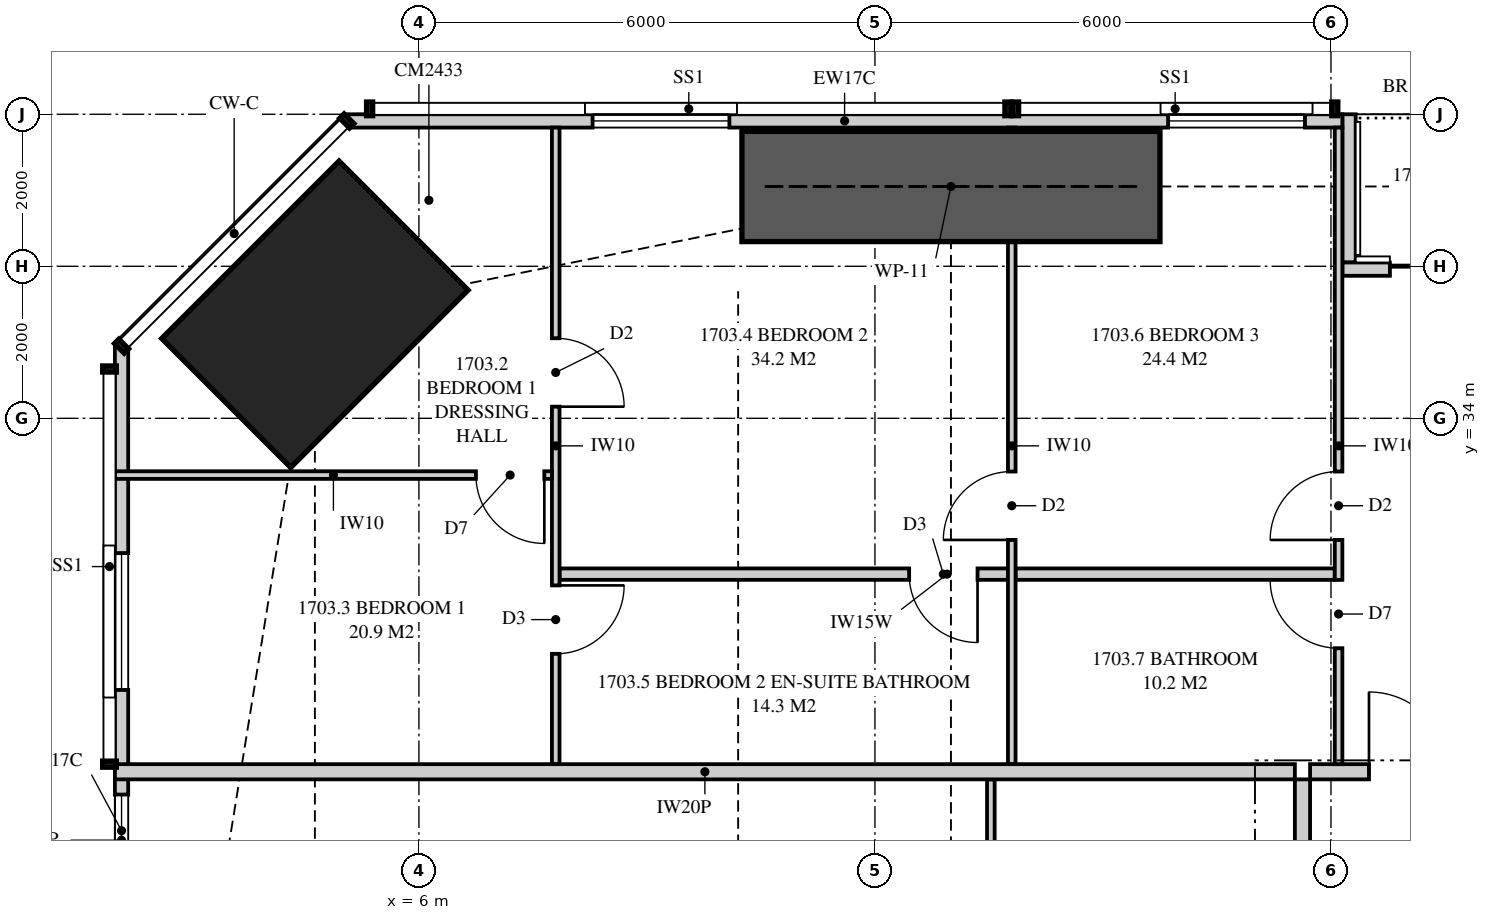
"""IFC4 building model, lengths in metres.
Left out: names, types, materials, properties, quantities, classifications, styles, units other than length and angle.
Written with IfcOpenShell. Run it as: python <this file> out.ifc"""

import sys

from ifc_helpers import new_model, si_unit, direction, frame, frame_2d, origin, origin_2d, place, context, subcontext, project, spatial, polyline, rectangle, outline, extrude, element, fill, save


model = new_model("IFC4")
c1 = context("Model", 3, precision=1e-05, world=origin(), true_north=direction((0.0, 1.0)))
c2 = subcontext(c1, "Body", "Model", "MODEL_VIEW")
j1 = project(units=[si_unit("LENGTHUNIT", "METRE"), si_unit("PLANEANGLEUNIT", "RADIAN")], contexts=[c1])
p1 = place(None, origin())
s1 = spatial("IfcSite", under=j1, at=p1, CompositionType="ELEMENT")
p2 = place(p1, origin())
s2 = spatial("IfcBuilding", under=s1, at=p2, CompositionType="ELEMENT")
p3 = place(p2, frame((0.0, 0.0, 64.55)))
s3 = spatial("IfcBuildingStorey", under=s2, at=p3, CompositionType="ELEMENT", Elevation=64.55)
p4 = place(p3, frame((4.631, 35.369, 0.0), z_axis=(0.0, 0.0, 1.0), x_axis=(0.707106781187, -0.707106781187, 0.0)))
e1 = element("IfcColumn", 1, at=p4, inside=s3, PredefinedType="COLUMN", context=c2, shape_type="SweptSolid", body=[
    extrude(rectangle(XDim=2.4, YDim=3.3, at=origin_2d()), origin(), (0.0, 0.0, 1.0), 3.35),
])
p5 = place(p3, frame((18.15, 37.913, 0.0), z_axis=(0.0, 0.0, 1.0), x_axis=(-1.0, 0.0, 0.0)))
e2 = element("IfcWall", 2, at=p5, inside=s3, PredefinedType="SOLIDWALL", context=c2, shape_type="SweptSolid", body=[
    extrude(outline(polyline([(0.0, 0.0), (13.099, 0.0), (13.099, 3.11), (5.354, 3.11), (5.354, 2.15), (5.306, 2.15), (5.306, 3.11), (5.15, 3.11), (5.15, 2.15), (0.0, 2.15), (0.0, 0.0)])), frame((0.0, 0.087, 0.0), z_axis=(0.0, -1.0, 0.0), x_axis=(1.0, 0.0, 0.0)), (0.0, 0.0, 1.0), 0.175),
])
p6 = place(p5, frame((0.492, 0.0, 0.4)))
e3 = element("IfcOpeningElement", 3, at=p6, cuts=e2, PredefinedType="OPENING", context=c2, shape_type="SweptSolid", body=[
    extrude(rectangle(XDim=1.8, YDim=1.7, at=frame_2d((0.9, 0.85))), frame((0.0, 0.097, 0.0), z_axis=(0.0, -1.0, 0.0), x_axis=(1.0, 0.0, 0.0)), (0.0, 0.0, 1.0), 0.195),
])
p7 = place(p5, frame((8.065, 0.0, 0.4)))
e4 = element("IfcOpeningElement", 4, at=p7, cuts=e2, PredefinedType="OPENING", context=c2, shape_type="SweptSolid", body=[
    extrude(rectangle(XDim=1.8, YDim=1.7, at=frame_2d((0.9, 0.85))), frame((0.0, 0.097, 0.0), z_axis=(0.0, -1.0, 0.0), x_axis=(1.0, 0.0, 0.0)), (0.0, 0.0, 1.0), 0.195),
])
p8 = place(p3, frame((21.2, 35.962, 0.0), z_axis=(0.0, 0.0, 1.0), x_axis=(-1.0, 0.0, 0.0)))
e5 = element("IfcWall", 5, at=p8, inside=s3, PredefinedType="SOLIDWALL", context=c2, shape_type="SweptSolid", body=[
    extrude(rectangle(XDim=3.05, YDim=0.175, at=frame_2d((1.525, 0.0))), origin(), (0.0, 0.0, 1.0), 3.11),
])
p9 = place(p8, frame((0.625, 0.0, 0.0)))
e6 = element("IfcOpeningElement", 6, at=p9, cuts=e5, PredefinedType="OPENING", context=c2, shape_type="SweptSolid", body=[
    extrude(rectangle(XDim=1.8, YDim=2.1, at=frame_2d((0.9, 1.05))), frame((0.0, 0.097, 0.0), z_axis=(0.0, -1.0, 0.0), x_axis=(1.0, 0.0, 0.0)), (0.0, 0.0, 1.0), 0.195),
])
p10 = place(p3, frame((18.238, 38.0, 0.0), z_axis=(0.0, 0.0, 1.0), x_axis=(0.0, -1.0, 0.0)))
e7 = element("IfcWall", 7, at=p10, inside=s3, PredefinedType="SOLIDWALL", context=c2, shape_type="SweptSolid", body=[
    extrude(outline(polyline([(0.0, 0.0), (1.95, 0.0), (1.95, 3.11), (1.75, 3.11), (1.75, 2.15), (0.15, 2.15), (0.15, 3.11), (0.0, 3.11), (0.0, 0.0)])), frame((0.0, 0.087, 0.0), z_axis=(0.0, -1.0, 0.0), x_axis=(1.0, 0.0, 0.0)), (0.0, 0.0, 1.0), 0.175),
])
p11 = place(p3, frame((2.087, 34.949, 0.0), z_axis=(0.0, 0.0, 1.0), x_axis=(0.0, -1.0, 0.0)))
e8 = element("IfcWall", 8, at=p11, inside=s3, PredefinedType="SOLIDWALL", context=c2, shape_type="SweptSolid", body=[
    extrude(outline(polyline([(0.0, 0.0), (12.749, 0.0), (12.749, 2.15), (9.949, 2.15), (9.949, 3.11), (9.823, 3.11), (9.823, 2.15), (9.73, 2.15), (9.73, 3.11), (0.0, 3.11), (0.0, 0.0)])), frame((0.0, 0.087, 0.0), z_axis=(0.0, -1.0, 0.0), x_axis=(1.0, 0.0, 0.0)), (0.0, 0.0, 1.0), 0.175),
])
p12 = place(p11, frame((2.722, 0.0, 0.4)))
e9 = element("IfcOpeningElement", 9, at=p12, cuts=e8, PredefinedType="OPENING", context=c2, shape_type="SweptSolid", body=[
    extrude(rectangle(XDim=1.8, YDim=1.7, at=frame_2d((0.9, 0.85))), frame((0.0, 0.097, 0.0), z_axis=(0.0, -1.0, 0.0), x_axis=(1.0, 0.0, 0.0)), (0.0, 0.0, 1.0), 0.195),
])
p13 = place(p11, frame((5.899, 0.0, 0.4)))
e10 = element("IfcOpeningElement", 10, at=p13, cuts=e8, PredefinedType="OPENING", context=c2, shape_type="SweptSolid", body=[
    extrude(rectangle(XDim=1.2, YDim=1.7, at=frame_2d((0.6, 0.85))), frame((0.0, 0.097, 0.0), z_axis=(0.0, -1.0, 0.0), x_axis=(1.0, 0.0, 0.0)), (0.0, 0.0, 1.0), 0.195),
])
p14 = place(p3, frame((17.725, 29.35, 0.0), z_axis=(0.0, 0.0, 1.0), x_axis=(1.0, 0.0, 0.0)))
e11 = element("IfcWall", 11, at=p14, inside=s3, PredefinedType="PARTITIONING", context=c2, shape_type="SweptSolid", body=[
    extrude(outline(polyline([(0.0, 0.0), (7.075, 0.0), (7.075, 3.11), (6.612, 3.11), (6.612, 2.541), (5.938, 2.541), (5.938, 3.11), (0.0, 3.11), (0.0, 0.0)])), frame((0.0, 0.1, 0.0), z_axis=(0.0, -1.0, 0.0), x_axis=(1.0, 0.0, 0.0)), (0.0, 0.0, 1.0), 0.2),
])
p15 = place(p14, frame((0.775, 0.0, 0.0)))
e12 = element("IfcOpeningElement", 12, at=p15, cuts=e11, PredefinedType="OPENING", context=c2, shape_type="SweptSolid", body=[
    extrude(rectangle(XDim=1.05, YDim=2.2, at=frame_2d((0.525, 1.1))), frame((0.0, 0.11, 0.0), z_axis=(0.0, -1.0, 0.0), x_axis=(1.0, 0.0, 0.0)), (0.0, 0.0, 1.0), 0.22),
])
p16 = place(p3, frame((7.8, 37.825, 0.0), z_axis=(0.0, 0.0, 1.0), x_axis=(0.0, -1.0, 0.0)))
e13 = element("IfcWall", 13, at=p16, inside=s3, PredefinedType="PARTITIONING", context=c2, shape_type="SweptSolid", body=[
    extrude(outline(polyline([(0.0, 0.0), (8.375, 0.0), (8.375, 3.11), (2.697, 3.11), (2.697, 2.15), (0.943, 2.15), (0.943, 3.11), (0.0, 3.11), (0.0, 0.0)])), frame((0.0, 0.05, 0.0), z_axis=(0.0, -1.0, 0.0), x_axis=(1.0, 0.0, 0.0)), (0.0, 0.0, 1.0), 0.1),
])
p17 = place(p16, frame((2.772, 0.0, 0.0)))
e14 = element("IfcOpeningElement", 14, at=p17, cuts=e13, PredefinedType="OPENING", context=c2, shape_type="SweptSolid", body=[
    extrude(rectangle(XDim=0.9, YDim=2.1, at=frame_2d((0.45, 1.05))), frame((0.0, 0.06, 0.0), z_axis=(0.0, -1.0, 0.0), x_axis=(1.0, 0.0, 0.0)), (0.0, 0.0, 1.0), 0.12),
])
p18 = place(p16, frame((6.023, 0.0, 0.0)))
e15 = element("IfcOpeningElement", 15, at=p18, cuts=e13, PredefinedType="OPENING", context=c2, shape_type="SweptSolid", body=[
    extrude(rectangle(XDim=0.9, YDim=2.1, at=frame_2d((0.45, 1.05))), frame((0.0, 0.06, 0.0), z_axis=(0.0, -1.0, 0.0), x_axis=(1.0, 0.0, 0.0)), (0.0, 0.0, 1.0), 0.12),
])
p19 = place(p3, frame((13.8, 37.825, 0.0), z_axis=(0.0, 0.0, 1.0), x_axis=(0.0, -1.0, 0.0)))
e16 = element("IfcWall", 16, at=p19, inside=s3, PredefinedType="PARTITIONING", context=c2, shape_type="SweptSolid", body=[
    extrude(outline(polyline([(1.635, 2.15), (0.0, 2.15), (0.0, 0.0), (8.375, 0.0), (8.375, 3.11), (1.635, 3.11), (1.635, 2.15)]), holes=[polyline([(1.021, 0.133), (0.529, 0.133), (0.529, 0.923), (1.021, 0.923), (1.021, 0.133)]), polyline([(1.021, 1.227), (0.529, 1.227), (0.529, 2.017), (1.021, 2.017), (1.021, 1.227)])]), frame((0.0, 0.05, 0.0), z_axis=(0.0, -1.0, 0.0), x_axis=(1.0, 0.0, 0.0)), (0.0, 0.0, 1.0), 0.1),
])
p20 = place(p19, frame((4.525, 0.0, 0.0)))
e17 = element("IfcOpeningElement", 17, at=p20, cuts=e16, PredefinedType="OPENING", context=c2, shape_type="SweptSolid", body=[
    extrude(rectangle(XDim=0.9, YDim=2.1, at=frame_2d((0.45, 1.05))), frame((0.0, 0.06, 0.0), z_axis=(0.0, -1.0, 0.0), x_axis=(1.0, 0.0, 0.0)), (0.0, 0.0, 1.0), 0.12),
])
p21 = place(p3, frame((18.1, 37.825, 0.0), z_axis=(0.0, 0.0, 1.0), x_axis=(0.0, -1.0, 0.0)))
e18 = element("IfcWall", 18, at=p21, inside=s3, PredefinedType="PARTITIONING", context=c2, shape_type="SweptSolid", body=[
    extrude(outline(polyline([(0.0, 0.0), (8.375, 0.0), (8.375, 3.11), (1.635, 3.11), (1.635, 2.15), (0.0, 2.15), (0.0, 3.11), (0.0, 0.0)])), frame((0.0, 0.05, 0.0), z_axis=(0.0, -1.0, 0.0), x_axis=(1.0, 0.0, 0.0)), (0.0, 0.0, 1.0), 0.1),
])
p22 = place(p21, frame((4.525, 0.0, 0.0)))
e19 = element("IfcOpeningElement", 19, at=p22, cuts=e18, PredefinedType="OPENING", context=c2, shape_type="SweptSolid", body=[
    extrude(rectangle(XDim=0.9, YDim=2.1, at=frame_2d((0.45, 1.05))), frame((0.0, 0.06, 0.0), z_axis=(0.0, -1.0, 0.0), x_axis=(1.0, 0.0, 0.0)), (0.0, 0.0, 1.0), 0.12),
])
p23 = place(p21, frame((5.95, 0.0, 0.0)))
e20 = element("IfcOpeningElement", 20, at=p23, cuts=e18, PredefinedType="OPENING", context=c2, shape_type="SweptSolid", body=[
    extrude(rectangle(XDim=0.9, YDim=2.1, at=frame_2d((0.45, 1.05))), frame((0.0, 0.06, 0.0), z_axis=(0.0, -1.0, 0.0), x_axis=(1.0, 0.0, 0.0)), (0.0, 0.0, 1.0), 0.12),
])
p24 = place(p3, frame((2.0, 33.253, 0.0), z_axis=(0.0, 0.0, 1.0), x_axis=(1.0, 0.0, 0.0)))
e21 = element("IfcWall", 21, at=p24, inside=s3, PredefinedType="PARTITIONING", context=c2, shape_type="SweptSolid", body=[
    extrude(outline(polyline([(0.0, 0.0), (5.75, 0.0), (5.75, 3.11), (3.16, 3.11), (3.16, 2.15), (1.417, 2.15), (1.417, 3.11), (0.0, 3.11), (0.0, 0.0)])), frame((0.0, 0.05, 0.0), z_axis=(0.0, -1.0, 0.0), x_axis=(1.0, 0.0, 0.0)), (0.0, 0.0, 1.0), 0.1),
])
p25 = place(p24, frame((4.75, 0.0, 0.0)))
e22 = element("IfcOpeningElement", 22, at=p25, cuts=e21, PredefinedType="OPENING", context=c2, shape_type="SweptSolid", body=[
    extrude(rectangle(XDim=0.9, YDim=2.1, at=frame_2d((0.45, 1.05))), frame((0.0, 0.06, 0.0), z_axis=(0.0, -1.0, 0.0), x_axis=(1.0, 0.0, 0.0)), (0.0, 0.0, 1.0), 0.12),
])
p26 = place(p3, frame((7.85, 31.95, 0.0), z_axis=(0.0, 0.0, 1.0), x_axis=(1.0, 0.0, 0.0)))
e23 = element("IfcWall", 23, at=p26, inside=s3, PredefinedType="PLUMBINGWALL", context=c2, shape_type="SweptSolid", body=[
    extrude(outline(polyline([(0.0, 0.0), (5.9, 0.0), (5.9, 3.11), (5.462, 3.11), (5.462, 2.541), (4.838, 2.541), (4.838, 3.11), (3.635, 3.11), (3.635, 2.51), (1.065, 2.51), (1.065, 3.11), (0.0, 3.11), (0.0, 0.0)])), frame((0.0, 0.075, 0.0), z_axis=(0.0, -1.0, 0.0), x_axis=(1.0, 0.0, 0.0)), (0.0, 0.0, 1.0), 0.15),
])
p27 = place(p26, frame((4.6, 0.0, 0.0)))
e24 = element("IfcOpeningElement", 24, at=p27, cuts=e23, PredefinedType="OPENING", context=c2, shape_type="SweptSolid", body=[
    extrude(rectangle(XDim=0.9, YDim=2.1, at=frame_2d((0.45, 1.05))), frame((0.0, 0.085, 0.0), z_axis=(0.0, -1.0, 0.0), x_axis=(1.0, 0.0, 0.0)), (0.0, 0.0, 1.0), 0.17),
])
p28 = place(p3, frame((13.85, 31.95, 0.0), z_axis=(0.0, 0.0, 1.0), x_axis=(1.0, 0.0, 0.0)))
e25 = element("IfcWall", 25, at=p28, inside=s3, PredefinedType="PLUMBINGWALL", context=c2, shape_type="SweptSolid", body=[
    extrude(rectangle(XDim=4.2, YDim=0.15, at=frame_2d((2.1, 0.0))), origin(), (0.0, 0.0, 1.0), 3.11),
])
p29 = place(p3, frame((2.0, 29.35, 0.0), z_axis=(0.0, 0.0, 1.0), x_axis=(1.0, 0.0, 0.0)))
e26 = element("IfcWall", 26, at=p29, inside=s3, PredefinedType="PARTITIONING", context=c2, shape_type="SweptSolid", body=[
    extrude(outline(polyline([(0.0, 0.0), (15.525, 0.0), (15.525, 3.11), (11.337, 3.11), (11.337, 2.541), (10.663, 2.541), (10.663, 3.11), (9.51, 3.11), (9.51, 2.51), (6.89, 2.51), (6.89, 3.11), (2.969, 3.11), (2.969, 2.541), (2.577, 2.541), (2.577, 2.15), (0.733, 2.15), (0.733, 3.11), (0.0, 3.11), (0.0, 0.0)])), frame((0.0, 0.1, 0.0), z_axis=(0.0, -1.0, 0.0), x_axis=(1.0, 0.0, 0.0)), (0.0, 0.0, 1.0), 0.2),
])
p30 = place(p3, frame((17.625, 14.1, 0.0), z_axis=(0.0, 0.0, 1.0), x_axis=(0.0, 1.0, 0.0)))
e27 = element("IfcWall", 27, at=p30, inside=s3, PredefinedType="PARTITIONING", context=c2, shape_type="SweptSolid", body=[
    extrude(outline(polyline([(0.0, 0.0), (15.15, 0.0), (15.15, 3.11), (11.237, 3.11), (11.237, 2.541), (10.562, 2.541), (10.562, 3.11), (0.0, 3.11), (0.0, 0.0)])), frame((0.0, 0.1, 0.0), z_axis=(0.0, -1.0, 0.0), x_axis=(1.0, 0.0, 0.0)), (0.0, 0.0, 1.0), 0.2),
])
p31 = place(p30, frame((7.075, 0.0, 0.0)))
e28 = element("IfcOpeningElement", 28, at=p31, cuts=e27, PredefinedType="OPENING", context=c2, shape_type="SweptSolid", body=[
    extrude(rectangle(XDim=1.05, YDim=2.2, at=frame_2d((0.525, 1.1))), frame((0.0, 0.11, 0.0), z_axis=(0.0, -1.0, 0.0), x_axis=(1.0, 0.0, 0.0)), (0.0, 0.0, 1.0), 0.22),
])
p32 = place(p3, frame((13.525, 18.15, 0.0), z_axis=(0.0, 0.0, 1.0), x_axis=(0.0, 1.0, 0.0)))
e29 = element("IfcWall", 29, at=p32, inside=s3, PredefinedType="PARTITIONING", context=c2, shape_type="SweptSolid", body=[
    extrude(outline(polyline([(0.0, 0.0), (11.1, 0.0), (11.1, 3.11), (7.137, 3.11), (7.137, 2.541), (6.563, 2.541), (6.563, 3.11), (0.0, 3.11), (0.0, 0.0)])), frame((0.0, 0.05, 0.0), z_axis=(0.0, -1.0, 0.0), x_axis=(1.0, 0.0, 0.0)), (0.0, 0.0, 1.0), 0.1),
])
p33 = place(p32, frame((3.025, 0.0, 0.0)))
e30 = element("IfcOpeningElement", 30, at=p33, cuts=e29, PredefinedType="OPENING", context=c2, shape_type="SweptSolid", body=[
    extrude(rectangle(XDim=1.0, YDim=2.1, at=frame_2d((0.5, 1.05))), frame((0.0, 0.06, 0.0), z_axis=(0.0, -1.0, 0.0), x_axis=(1.0, 0.0, 0.0)), (0.0, 0.0, 1.0), 0.12),
])
p34 = place(p3, frame((10.25, 37.05, 0.0), z_axis=(0.0, 0.0, 1.0), x_axis=(1.0, 0.0, 0.0)))
e31 = element("IfcWall", 31, at=p34, inside=s3, PredefinedType="SHEAR", context=c2, shape_type="SweptSolid", body=[
    extrude(rectangle(XDim=5.5, YDim=1.45, at=frame_2d((2.75, 0.0))), origin(), (0.0, 0.0, 1.0), 3.35),
])
p35 = place(p9, origin())
e32 = element("IfcDoor", 32, at=p35, inside=s3, OperationType="SLIDING_TO_LEFT", PredefinedType="DOOR", context=c2, shape_type="SweptSolid", body=[
    extrude(rectangle(XDim=1.8, YDim=2.1, at=frame_2d((0.9, 1.05))), frame((0.0, 0.025, 0.0), z_axis=(0.0, -1.0, 0.0), x_axis=(1.0, 0.0, 0.0)), (0.0, 0.0, 1.0), 0.05),
])
fill(e6, e32)
p36 = place(p6, origin())
e33 = element("IfcWindow", 33, at=p36, inside=s3, PartitioningType="SINGLE_PANEL", PredefinedType="WINDOW", context=c2, shape_type="SweptSolid", body=[
    extrude(rectangle(XDim=1.8, YDim=1.7, at=frame_2d((0.9, 0.85))), frame((0.0, 0.03, 0.0), z_axis=(0.0, -1.0, 0.0), x_axis=(1.0, 0.0, 0.0)), (0.0, 0.0, 1.0), 0.06),
])
fill(e3, e33)
p37 = place(p7, origin())
e34 = element("IfcWindow", 34, at=p37, inside=s3, PartitioningType="SINGLE_PANEL", PredefinedType="WINDOW", context=c2, shape_type="SweptSolid", body=[
    extrude(rectangle(XDim=1.8, YDim=1.7, at=frame_2d((0.9, 0.85))), frame((0.0, 0.03, 0.0), z_axis=(0.0, -1.0, 0.0), x_axis=(1.0, 0.0, 0.0)), (0.0, 0.0, 1.0), 0.06),
])
fill(e4, e34)
p38 = place(p12, origin())
e35 = element("IfcWindow", 35, at=p38, inside=s3, PartitioningType="SINGLE_PANEL", PredefinedType="WINDOW", context=c2, shape_type="SweptSolid", body=[
    extrude(rectangle(XDim=1.8, YDim=1.7, at=frame_2d((0.9, 0.85))), frame((0.0, 0.03, 0.0), z_axis=(0.0, -1.0, 0.0), x_axis=(1.0, 0.0, 0.0)), (0.0, 0.0, 1.0), 0.06),
])
fill(e9, e35)
p39 = place(p13, origin())
e36 = element("IfcWindow", 36, at=p39, inside=s3, PartitioningType="SINGLE_PANEL", PredefinedType="WINDOW", context=c2, shape_type="SweptSolid", body=[
    extrude(rectangle(XDim=1.2, YDim=1.7, at=frame_2d((0.6, 0.85))), frame((0.0, 0.03, 0.0), z_axis=(0.0, -1.0, 0.0), x_axis=(1.0, 0.0, 0.0)), (0.0, 0.0, 1.0), 0.06),
])
fill(e10, e36)
p40 = place(p15, origin())
e37 = element("IfcDoor", 37, at=p40, inside=s3, OperationType="SINGLE_SWING_LEFT", PredefinedType="DOOR", context=c2, shape_type="SweptSolid", body=[
    extrude(rectangle(XDim=1.05, YDim=2.2, at=frame_2d((0.525, 1.1))), frame((0.0, 0.025, 0.0), z_axis=(0.0, -1.0, 0.0), x_axis=(1.0, 0.0, 0.0)), (0.0, 0.0, 1.0), 0.05),
])
fill(e12, e37)
p41 = place(p25, frame((0.9, 0.0, 0.0), z_axis=(0.0, 0.0, 1.0), x_axis=(-1.0, 0.0, 0.0)))
e38 = element("IfcDoor", 38, at=p41, inside=s3, OperationType="SINGLE_SWING_LEFT", PredefinedType="DOOR", context=c2, shape_type="SweptSolid", body=[
    extrude(rectangle(XDim=0.9, YDim=2.1, at=frame_2d((0.45, 1.05))), frame((0.0, 0.025, 0.0), z_axis=(0.0, -1.0, 0.0), x_axis=(1.0, 0.0, 0.0)), (0.0, 0.0, 1.0), 0.05),
])
fill(e22, e38)
p42 = place(p17, origin())
e39 = element("IfcDoor", 39, at=p42, inside=s3, OperationType="SINGLE_SWING_RIGHT", PredefinedType="DOOR", context=c2, shape_type="SweptSolid", body=[
    extrude(rectangle(XDim=0.9, YDim=2.1, at=frame_2d((0.45, 1.05))), frame((0.0, 0.025, 0.0), z_axis=(0.0, -1.0, 0.0), x_axis=(1.0, 0.0, 0.0)), (0.0, 0.0, 1.0), 0.05),
])
fill(e14, e39)
p43 = place(p20, frame((0.9, 0.0, 0.0), z_axis=(0.0, 0.0, 1.0), x_axis=(-1.0, 0.0, 0.0)))
e40 = element("IfcDoor", 40, at=p43, inside=s3, OperationType="SINGLE_SWING_LEFT", PredefinedType="DOOR", context=c2, shape_type="SweptSolid", body=[
    extrude(rectangle(XDim=0.9, YDim=2.1, at=frame_2d((0.45, 1.05))), frame((0.0, 0.025, 0.0), z_axis=(0.0, -1.0, 0.0), x_axis=(1.0, 0.0, 0.0)), (0.0, 0.0, 1.0), 0.05),
])
fill(e17, e40)
p44 = place(p27, frame((0.9, 0.0, 0.0), z_axis=(0.0, 0.0, 1.0), x_axis=(-1.0, 0.0, 0.0)))
e41 = element("IfcDoor", 41, at=p44, inside=s3, OperationType="SINGLE_SWING_LEFT", PredefinedType="DOOR", context=c2, shape_type="SweptSolid", body=[
    extrude(rectangle(XDim=0.9, YDim=2.1, at=frame_2d((0.45, 1.05))), frame((0.0, 0.025, 0.0), z_axis=(0.0, -1.0, 0.0), x_axis=(1.0, 0.0, 0.0)), (0.0, 0.0, 1.0), 0.05),
])
fill(e24, e41)
p45 = place(p22, frame((0.9, 0.0, 0.0), z_axis=(0.0, 0.0, 1.0), x_axis=(-1.0, 0.0, 0.0)))
e42 = element("IfcDoor", 42, at=p45, inside=s3, OperationType="SINGLE_SWING_LEFT", PredefinedType="DOOR", context=c2, shape_type="SweptSolid", body=[
    extrude(rectangle(XDim=0.9, YDim=2.1, at=frame_2d((0.45, 1.05))), frame((0.0, 0.025, 0.0), z_axis=(0.0, -1.0, 0.0), x_axis=(1.0, 0.0, 0.0)), (0.0, 0.0, 1.0), 0.05),
])
fill(e19, e42)
p46 = place(p23, frame((0.9, 0.0, 0.0), z_axis=(0.0, 0.0, 1.0), x_axis=(-1.0, 0.0, 0.0)))
e43 = element("IfcDoor", 43, at=p46, inside=s3, OperationType="SINGLE_SWING_RIGHT", PredefinedType="DOOR", context=c2, shape_type="SweptSolid", body=[
    extrude(rectangle(XDim=0.9, YDim=2.1, at=frame_2d((0.45, 1.05))), frame((0.0, 0.025, 0.0), z_axis=(0.0, -1.0, 0.0), x_axis=(1.0, 0.0, 0.0)), (0.0, 0.0, 1.0), 0.05),
])
fill(e20, e43)
p47 = place(p18, origin())
e44 = element("IfcDoor", 44, at=p47, inside=s3, OperationType="SINGLE_SWING_LEFT", PredefinedType="DOOR", context=c2, shape_type="SweptSolid", body=[
    extrude(rectangle(XDim=0.9, YDim=2.1, at=frame_2d((0.45, 1.05))), frame((0.0, 0.025, 0.0), z_axis=(0.0, -1.0, 0.0), x_axis=(1.0, 0.0, 0.0)), (0.0, 0.0, 1.0), 0.05),
])
fill(e15, e44)
save(model, sys.argv[1])
